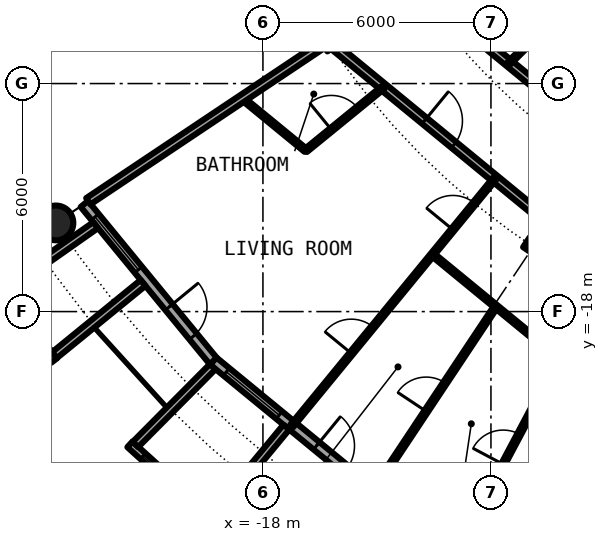
"""IFC4 building model, lengths in metres.
Left out: names, types, materials, properties, quantities, classifications, styles, units other than length and angle.
Written with IfcOpenShell. Run it as: python <this file> out.ifc"""

import sys

from ifc_helpers import new_model, si_unit, direction, frame, frame_2d, origin, origin_2d, place, context, subcontext, project, spatial, rectangle, circle, hollow_circle, i_section, extrude, element, fill, save


model = new_model("IFC4")
c1 = context("Model", 3, precision=1e-05, world=origin(), true_north=direction((0.0, 1.0)))
c2 = subcontext(c1, "Body", "Model", "MODEL_VIEW")
j1 = project(units=[si_unit("LENGTHUNIT", "METRE"), si_unit("PLANEANGLEUNIT", "RADIAN")], contexts=[c1])
p1 = place(None, origin())
s1 = spatial("IfcSite", under=j1, at=p1, CompositionType="ELEMENT")
p2 = place(p1, origin())
s2 = spatial("IfcBuilding", under=s1, at=p2, CompositionType="ELEMENT")
p3 = place(p2, frame((0.0, 0.0, 111.65)))
s3 = spatial("IfcBuildingStorey", under=s2, at=p3, CompositionType="ELEMENT", Elevation=111.65)
p4 = place(p3, frame((-23.448, -15.667, 0.0), z_axis=(0.0, 0.0, 1.0), x_axis=(1.0, 0.0, 0.0)))
e1 = element("IfcColumn", 1, at=p4, inside=s3, PredefinedType="COLUMN", context=c2, shape_type="SweptSolid", body=[
    extrude(hollow_circle(Radius=0.457, WallThickness=0.04, at=origin_2d()), origin(), (0.0, 0.0, 1.0), 3.05),
])
p5 = place(p3, frame((-10.889, -16.297, 0.0), z_axis=(0.0, 0.0, 1.0), x_axis=(-0.55557023302, -0.831469612303, 0.0)))
e2 = element("IfcColumn", 2, at=p5, inside=s3, PredefinedType="COLUMN", context=c2, shape_type="SweptSolid", body=[
    extrude(i_section(OverallWidth=0.307, OverallDepth=0.432, WebThickness=0.021, FlangeThickness=0.04, FilletRadius=0.027, at=origin_2d()), origin(), (0.0, 0.0, 1.0), 3.05),
])
p6 = place(p3, frame((-22.699, -15.167, 0.0), z_axis=(0.0, 0.0, 1.0), x_axis=(0.634382322723, -0.773019449054, 0.0)))
e3 = element("IfcWall", 3, at=p6, inside=s3, PredefinedType="SOLIDWALL", context=c2, shape_type="SweptSolid", body=[
    extrude(rectangle(XDim=5.352, YDim=0.25, at=frame_2d((2.676, 0.0))), origin(), (0.0, 0.0, 1.0), 2.7),
])
p7 = place(p6, frame((0.441, 0.0, 0.3)))
e4 = element("IfcOpeningElement", 4, at=p7, cuts=e3, PredefinedType="OPENING", context=c2, shape_type="SweptSolid", body=[
    extrude(rectangle(XDim=1.8, YDim=2.1, at=frame_2d((0.9, 1.05))), frame((0.0, 0.135, 0.0), z_axis=(0.0, -1.0, 0.0), x_axis=(1.0, 0.0, 0.0)), (0.0, 0.0, 1.0), 0.27),
])
p8 = place(p6, frame((3.51, 0.0, 0.0)))
e5 = element("IfcOpeningElement", 5, at=p8, cuts=e3, PredefinedType="OPENING", context=c2, shape_type="SweptSolid", body=[
    extrude(rectangle(XDim=1.0, YDim=2.2, at=frame_2d((0.5, 1.1))), frame((0.0, 0.135, 0.0), z_axis=(0.0, -1.0, 0.0), x_axis=(1.0, 0.0, 0.0)), (0.0, 0.0, 1.0), 0.27),
])
p9 = place(p3, frame((-24.94, -17.382, -0.03), z_axis=(0.0, 0.0, 1.0), x_axis=(0.603375996329, -0.797456837111, 0.0)))
e6 = element("IfcWall", 6, at=p9, inside=s3, PredefinedType="SOLIDWALL", context=c2, shape_type="SweptSolid", body=[
    extrude(rectangle(XDim=2.391, YDim=0.2, at=frame_2d((1.196, 0.0))), origin(), (0.0, 0.0, 1.0), 2.73),
])
p10 = place(p9, frame((0.156, 0.0, 0.33)))
e7 = element("IfcOpeningElement", 7, at=p10, cuts=e6, PredefinedType="OPENING", context=c2, shape_type="SweptSolid", body=[
    extrude(circle(Radius=1.04, at=frame_2d((1.04, 1.04))), frame((0.0, 0.11, 0.0), z_axis=(0.0, -1.0, 0.0), x_axis=(1.0, 0.0, 0.0)), (0.0, 0.0, 1.0), 0.22),
])
p11 = place(p3, frame((-22.402, -15.726, -0.03), z_axis=(0.0, 0.0, 1.0), x_axis=(-0.818275399393, -0.574826383135, 0.0)))
e8 = element("IfcWall", 8, at=p11, inside=s3, PredefinedType="SOLIDWALL", context=c2, shape_type="SweptSolid", body=[
    extrude(rectangle(XDim=2.929, YDim=0.2, at=frame_2d((1.465, 0.0))), origin(), (0.0, 0.0, 1.0), 2.73),
])
p12 = place(p3, frame((-21.155, -17.246, -0.03), z_axis=(0.0, 0.0, 1.0), x_axis=(-0.775179004516, -0.631741648902, 0.0)))
e9 = element("IfcWall", 9, at=p12, inside=s3, PredefinedType="SOLIDWALL", context=c2, shape_type="SweptSolid", body=[
    extrude(rectangle(XDim=3.006, YDim=0.2, at=frame_2d((1.503, 0.0))), origin(), (0.0, 0.0, 1.0), 2.73),
])
p13 = place(p3, frame((-19.304, -19.304, 0.0), z_axis=(0.0, 0.0, 1.0), x_axis=(0.773019449054, -0.634382322723, 0.0)))
e10 = element("IfcWall", 10, at=p13, inside=s3, PredefinedType="SOLIDWALL", context=c2, shape_type="SweptSolid", body=[
    extrude(rectangle(XDim=5.352, YDim=0.25, at=frame_2d((2.676, 0.0))), origin(), (0.0, 0.0, 1.0), 2.7),
])
p14 = place(p13, frame((0.441, 0.0, 0.3)))
e11 = element("IfcOpeningElement", 11, at=p14, cuts=e10, PredefinedType="OPENING", context=c2, shape_type="SweptSolid", body=[
    extrude(rectangle(XDim=1.8, YDim=2.1, at=frame_2d((0.9, 1.05))), frame((0.0, 0.135, 0.0), z_axis=(0.0, -1.0, 0.0), x_axis=(1.0, 0.0, 0.0)), (0.0, 0.0, 1.0), 0.27),
])
p15 = place(p13, frame((3.51, 0.0, 0.0)))
e12 = element("IfcOpeningElement", 12, at=p15, cuts=e10, PredefinedType="OPENING", context=c2, shape_type="SweptSolid", body=[
    extrude(rectangle(XDim=1.0, YDim=2.2, at=frame_2d((0.5, 1.1))), frame((0.0, 0.135, 0.0), z_axis=(0.0, -1.0, 0.0), x_axis=(1.0, 0.0, 0.0)), (0.0, 0.0, 1.0), 0.27),
])
p16 = place(p3, frame((-21.5, -21.493, -0.03), z_axis=(0.0, 0.0, 1.0), x_axis=(0.740998365753, -0.671506829416, 0.0)))
e13 = element("IfcWall", 13, at=p16, inside=s3, PredefinedType="SOLIDWALL", context=c2, shape_type="SweptSolid", body=[
    extrude(rectangle(XDim=2.993, YDim=0.2, at=frame_2d((1.497, 0.0))), origin(), (0.0, 0.0, 1.0), 2.73),
])
p17 = place(p16, frame((0.457, 0.0, 0.33)))
e14 = element("IfcOpeningElement", 14, at=p17, cuts=e13, PredefinedType="OPENING", context=c2, shape_type="SweptSolid", body=[
    extrude(circle(Radius=1.04, at=frame_2d((1.04, 1.04))), frame((0.0, 0.11, 0.0), z_axis=(0.0, -1.0, 0.0), x_axis=(1.0, 0.0, 0.0)), (0.0, 0.0, 1.0), 0.22),
])
p18 = place(p3, frame((-19.323, -19.45, -0.03), z_axis=(0.0, 0.0, 1.0), x_axis=(-0.704476739375, -0.709727076896, 0.0)))
e15 = element("IfcWall", 15, at=p18, inside=s3, PredefinedType="SOLIDWALL", context=c2, shape_type="SweptSolid", body=[
    extrude(rectangle(XDim=2.883, YDim=0.2, at=frame_2d((1.441, 0.0))), origin(), (0.0, 0.0, 1.0), 2.73),
])
p19 = place(p3, frame((-17.384, -21.041, -0.03), z_axis=(0.0, 0.0, 1.0), x_axis=(-0.63709551667, -0.770784861449, 0.0)))
e16 = element("IfcWall", 16, at=p19, inside=s3, PredefinedType="SOLIDWALL", context=c2, shape_type="SweptSolid", body=[
    extrude(rectangle(XDim=3.006, YDim=0.2, at=frame_2d((1.503, 0.0))), origin(), (0.0, 0.0, 1.0), 2.73),
])
p20 = place(p3, frame((-18.542, -12.389, 0.0), z_axis=(0.0, 0.0, 1.0), x_axis=(0.772948171844, -0.634469166818, 0.0)))
e17 = element("IfcWall", 17, at=p20, inside=s3, PredefinedType="PARTITIONING", context=c2, shape_type="SweptSolid", body=[
    extrude(rectangle(XDim=2.158, YDim=0.1, at=frame_2d((1.079, 0.0))), origin(), (0.0, 0.0, 1.0), 2.7),
])
p21 = place(p3, frame((-13.538, -16.496, 0.0), z_axis=(0.0, 0.0, 1.0), x_axis=(0.773000340237, -0.634405606843, 0.0)))
e18 = element("IfcWall", 18, at=p21, inside=s3, PredefinedType="PARTITIONING", context=c2, shape_type="SweptSolid", body=[
    extrude(rectangle(XDim=6.474, YDim=0.1, at=frame_2d((3.237, 0.0))), origin(), (0.0, 0.0, 1.0), 2.7),
])
p22 = place(p3, frame((-16.173, -10.991, 0.0), z_axis=(0.0, 0.0, 1.0), x_axis=(0.773013989296, -0.634388975591, 0.0)))
e19 = element("IfcWall", 19, at=p22, inside=s3, PredefinedType="PARTITIONING", context=c2, shape_type="SweptSolid", body=[
    extrude(rectangle(XDim=11.219, YDim=0.2, at=frame_2d((5.609, 0.0))), origin(), (0.0, 0.0, 1.0), 2.39),
])
p23 = place(p22, frame((3.135, 0.0, 0.0)))
e20 = element("IfcOpeningElement", 20, at=p23, cuts=e19, PredefinedType="OPENING", context=c2, shape_type="SweptSolid", body=[
    extrude(rectangle(XDim=1.0, YDim=2.3, at=frame_2d((0.5, 1.15))), frame((0.0, 0.11, 0.0), z_axis=(0.0, -1.0, 0.0), x_axis=(1.0, 0.0, 0.0)), (0.0, 0.0, 1.0), 0.22),
])
p24 = place(p3, frame((-14.05, -9.392, 0.0), z_axis=(0.0, 0.0, 1.0), x_axis=(0.773074935257, -0.634314704605, 0.0)))
e21 = element("IfcWall", 21, at=p24, inside=s3, PredefinedType="PARTITIONING", context=c2, shape_type="SweptSolid", body=[
    extrude(rectangle(XDim=9.809, YDim=0.2, at=frame_2d((4.904, 0.0))), origin(), (0.0, 0.0, 1.0), 2.7),
])
p25 = place(p24, frame((4.402, 0.0, 0.0)))
e22 = element("IfcOpeningElement", 22, at=p25, cuts=e21, PredefinedType="OPENING", context=c2, shape_type="SweptSolid", body=[
    extrude(rectangle(XDim=1.0, YDim=2.3, at=frame_2d((0.5, 1.15))), frame((0.0, 0.11, 0.0), z_axis=(0.0, -1.0, 0.0), x_axis=(1.0, 0.0, 0.0)), (0.0, 0.0, 1.0), 0.22),
])
p26 = place(p3, frame((-22.595, -15.097, 0.0), z_axis=(0.0, 0.0, 1.0), x_axis=(0.831467903109, 0.555572791, 0.0)))
e23 = element("IfcWall", 23, at=p26, inside=s3, PredefinedType="PARTITIONING", context=c2, shape_type="SweptSolid", body=[
    extrude(rectangle(XDim=7.358, YDim=0.2, at=frame_2d((3.679, 0.0))), origin(), (0.0, 0.0, 1.0), 2.7),
])
p27 = place(p3, frame((-17.24, -21.007, 0.0), z_axis=(0.0, 0.0, 1.0), x_axis=(0.634396151441, 0.77300810024, 0.0)))
e24 = element("IfcWall", 24, at=p27, inside=s3, PredefinedType="PARTITIONING", context=c2, shape_type="SweptSolid", body=[
    extrude(rectangle(XDim=8.419, YDim=0.1, at=frame_2d((4.209, 0.0))), origin(), (0.0, 0.0, 1.0), 2.7),
])
p28 = place(p27, frame((6.679, 0.0, 0.0)))
e25 = element("IfcOpeningElement", 25, at=p28, cuts=e24, PredefinedType="OPENING", context=c2, shape_type="SweptSolid", body=[
    extrude(rectangle(XDim=0.9, YDim=2.3, at=frame_2d((0.45, 1.15))), frame((0.0, 0.06, 0.0), z_axis=(0.0, -1.0, 0.0), x_axis=(1.0, 0.0, 0.0)), (0.0, 0.0, 1.0), 0.12),
])
p29 = place(p27, frame((2.468, 0.0, 0.0)))
e26 = element("IfcOpeningElement", 26, at=p29, cuts=e24, PredefinedType="OPENING", context=c2, shape_type="SweptSolid", body=[
    extrude(rectangle(XDim=0.9, YDim=2.3, at=frame_2d((0.45, 1.15))), frame((0.0, 0.06, 0.0), z_axis=(0.0, -1.0, 0.0), x_axis=(1.0, 0.0, 0.0)), (0.0, 0.0, 1.0), 0.12),
])
p30 = place(p3, frame((-16.872, -13.761, 0.0), z_axis=(0.0, 0.0, 1.0), x_axis=(0.774979608522, 0.631986239072, 0.0)))
e27 = element("IfcWall", 27, at=p30, inside=s3, PredefinedType="PARTITIONING", context=c2, shape_type="SweptSolid", body=[
    extrude(rectangle(XDim=2.636, YDim=0.1, at=frame_2d((1.318, 0.0))), origin(), (0.0, 0.0, 1.0), 2.7),
])
p31 = place(p30, frame((0.868, 0.0, 0.0)))
e28 = element("IfcOpeningElement", 28, at=p31, cuts=e27, PredefinedType="OPENING", context=c2, shape_type="SweptSolid", body=[
    extrude(rectangle(XDim=0.9, YDim=2.3, at=frame_2d((0.45, 1.15))), frame((0.0, 0.06, 0.0), z_axis=(0.0, -1.0, 0.0), x_axis=(1.0, 0.0, 0.0)), (0.0, 0.0, 1.0), 0.12),
])
p32 = place(p3, frame((-15.041, -22.632, 0.0), z_axis=(0.0, 0.0, 1.0), x_axis=(0.553637025191, 0.83275809473, 0.0)))
e29 = element("IfcWall", 29, at=p32, inside=s3, PredefinedType="PARTITIONING", context=c2, shape_type="SweptSolid", body=[
    extrude(rectangle(XDim=5.726, YDim=0.1, at=frame_2d((2.863, 0.0))), origin(), (0.0, 0.0, 1.0), 2.7),
])
p33 = place(p32, frame((2.412, 0.0, 0.0)))
e30 = element("IfcOpeningElement", 30, at=p33, cuts=e29, PredefinedType="OPENING", context=c2, shape_type="SweptSolid", body=[
    extrude(rectangle(XDim=0.9, YDim=2.3, at=frame_2d((0.45, 1.15))), frame((0.0, 0.06, 0.0), z_axis=(0.0, -1.0, 0.0), x_axis=(1.0, 0.0, 0.0)), (0.0, 0.0, 1.0), 0.12),
])
p34 = place(p3, frame((-12.734, -24.007, 0.0), z_axis=(0.0, 0.0, 1.0), x_axis=(0.468610030042, 0.883405139075, 0.0)))
e31 = element("IfcWall", 31, at=p34, inside=s3, PredefinedType="PARTITIONING", context=c2, shape_type="SweptSolid", body=[
    extrude(rectangle(XDim=5.403, YDim=0.1, at=frame_2d((2.702, 0.0))), origin(), (0.0, 0.0, 1.0), 2.7),
])
p35 = place(p34, frame((2.252, 0.0, 0.0)))
e32 = element("IfcOpeningElement", 32, at=p35, cuts=e31, PredefinedType="OPENING", context=c2, shape_type="SweptSolid", body=[
    extrude(rectangle(XDim=0.9, YDim=2.3, at=frame_2d((0.45, 1.15))), frame((0.0, 0.06, 0.0), z_axis=(0.0, -1.0, 0.0), x_axis=(1.0, 0.0, 0.0)), (0.0, 0.0, 1.0), 0.12),
])
p36 = place(p3, frame((-11.524, -11.464, 0.0), z_axis=(0.0, 0.0, 1.0), x_axis=(0.708796844581, 0.705412668665, 0.0)))
e33 = element("IfcWall", 33, at=p36, inside=s3, PredefinedType="PARTITIONING", context=c2, shape_type="SweptSolid", body=[
    extrude(rectangle(XDim=2.597, YDim=0.1, at=frame_2d((1.299, 0.0))), origin(), (0.0, 0.0, 1.0), 2.7),
])
p37 = place(p36, frame((0.849, 0.0, 0.0)))
e34 = element("IfcOpeningElement", 34, at=p37, cuts=e33, PredefinedType="OPENING", context=c2, shape_type="SweptSolid", body=[
    extrude(rectangle(XDim=0.9, YDim=2.3, at=frame_2d((0.45, 1.15))), frame((0.0, 0.06, 0.0), z_axis=(0.0, -1.0, 0.0), x_axis=(1.0, 0.0, 0.0)), (0.0, 0.0, 1.0), 0.12),
])
p38 = place(p7, origin())
e35 = element("IfcWindow", 35, at=p38, inside=s3, PartitioningType="SINGLE_PANEL", PredefinedType="WINDOW", context=c2, shape_type="SweptSolid", body=[
    extrude(rectangle(XDim=1.8, YDim=2.1, at=frame_2d((0.9, 1.05))), frame((0.0, 0.03, 0.0), z_axis=(0.0, -1.0, 0.0), x_axis=(1.0, 0.0, 0.0)), (0.0, 0.0, 1.0), 0.06),
])
fill(e4, e35)
p39 = place(p8, origin())
e36 = element("IfcDoor", 36, at=p39, inside=s3, OperationType="SINGLE_SWING_LEFT", PredefinedType="DOOR", context=c2, shape_type="SweptSolid", body=[
    extrude(rectangle(XDim=1.0, YDim=2.2, at=frame_2d((0.5, 1.1))), frame((0.0, 0.025, 0.0), z_axis=(0.0, -1.0, 0.0), x_axis=(1.0, 0.0, 0.0)), (0.0, 0.0, 1.0), 0.05),
])
fill(e5, e36)
p40 = place(p14, origin())
e37 = element("IfcWindow", 37, at=p40, inside=s3, PartitioningType="SINGLE_PANEL", PredefinedType="WINDOW", context=c2, shape_type="SweptSolid", body=[
    extrude(rectangle(XDim=1.8, YDim=2.1, at=frame_2d((0.9, 1.05))), frame((0.0, 0.03, 0.0), z_axis=(0.0, -1.0, 0.0), x_axis=(1.0, 0.0, 0.0)), (0.0, 0.0, 1.0), 0.06),
])
fill(e11, e37)
p41 = place(p17, origin())
e38 = element("IfcWindow", 38, at=p41, inside=s3, PartitioningType="SINGLE_PANEL", PredefinedType="WINDOW", context=c2, shape_type="SweptSolid", body=[
    extrude(circle(Radius=1.04, at=frame_2d((1.04, 1.04))), frame((0.0, 0.03, 0.0), z_axis=(0.0, -1.0, 0.0), x_axis=(1.0, 0.0, 0.0)), (0.0, 0.0, 1.0), 0.06),
])
fill(e14, e38)
p42 = place(p15, origin())
e39 = element("IfcDoor", 39, at=p42, inside=s3, OperationType="SINGLE_SWING_LEFT", PredefinedType="DOOR", context=c2, shape_type="SweptSolid", body=[
    extrude(rectangle(XDim=1.0, YDim=2.2, at=frame_2d((0.5, 1.1))), frame((0.0, 0.025, 0.0), z_axis=(0.0, -1.0, 0.0), x_axis=(1.0, 0.0, 0.0)), (0.0, 0.0, 1.0), 0.05),
])
fill(e12, e39)
p43 = place(p23, origin())
e40 = element("IfcDoor", 40, at=p43, inside=s3, OperationType="SINGLE_SWING_LEFT", PredefinedType="DOOR", context=c2, shape_type="SweptSolid", body=[
    extrude(rectangle(XDim=1.0, YDim=2.3, at=frame_2d((0.5, 1.15))), frame((0.0, 0.025, 0.0), z_axis=(0.0, -1.0, 0.0), x_axis=(1.0, 0.0, 0.0)), (0.0, 0.0, 1.0), 0.05),
])
fill(e20, e40)
p44 = place(p31, origin())
e41 = element("IfcDoor", 41, at=p44, inside=s3, OperationType="SINGLE_SWING_RIGHT", PredefinedType="DOOR", context=c2, shape_type="SweptSolid", body=[
    extrude(rectangle(XDim=0.9, YDim=2.3, at=frame_2d((0.45, 1.15))), frame((0.0, 0.025, 0.0), z_axis=(0.0, -1.0, 0.0), x_axis=(1.0, 0.0, 0.0)), (0.0, 0.0, 1.0), 0.05),
])
fill(e28, e41)
p45 = place(p28, origin())
e42 = element("IfcDoor", 42, at=p45, inside=s3, OperationType="SINGLE_SWING_RIGHT", PredefinedType="DOOR", context=c2, shape_type="SweptSolid", body=[
    extrude(rectangle(XDim=0.9, YDim=2.3, at=frame_2d((0.45, 1.15))), frame((0.0, 0.025, 0.0), z_axis=(0.0, -1.0, 0.0), x_axis=(1.0, 0.0, 0.0)), (0.0, 0.0, 1.0), 0.05),
])
fill(e25, e42)
p46 = place(p29, origin())
e43 = element("IfcDoor", 43, at=p46, inside=s3, OperationType="SINGLE_SWING_LEFT", PredefinedType="DOOR", context=c2, shape_type="SweptSolid", body=[
    extrude(rectangle(XDim=0.9, YDim=2.3, at=frame_2d((0.45, 1.15))), frame((0.0, 0.025, 0.0), z_axis=(0.0, -1.0, 0.0), x_axis=(1.0, 0.0, 0.0)), (0.0, 0.0, 1.0), 0.05),
])
fill(e26, e43)
p47 = place(p33, origin())
e44 = element("IfcDoor", 44, at=p47, inside=s3, OperationType="SINGLE_SWING_LEFT", PredefinedType="DOOR", context=c2, shape_type="SweptSolid", body=[
    extrude(rectangle(XDim=0.9, YDim=2.3, at=frame_2d((0.45, 1.15))), frame((0.0, 0.025, 0.0), z_axis=(0.0, -1.0, 0.0), x_axis=(1.0, 0.0, 0.0)), (0.0, 0.0, 1.0), 0.05),
])
fill(e30, e44)
p48 = place(p35, origin())
e45 = element("IfcDoor", 45, at=p48, inside=s3, OperationType="SINGLE_SWING_LEFT", PredefinedType="DOOR", context=c2, shape_type="SweptSolid", body=[
    extrude(rectangle(XDim=0.9, YDim=2.3, at=frame_2d((0.45, 1.15))), frame((0.0, 0.025, 0.0), z_axis=(0.0, -1.0, 0.0), x_axis=(1.0, 0.0, 0.0)), (0.0, 0.0, 1.0), 0.05),
])
fill(e32, e45)
save(model, sys.argv[1])
